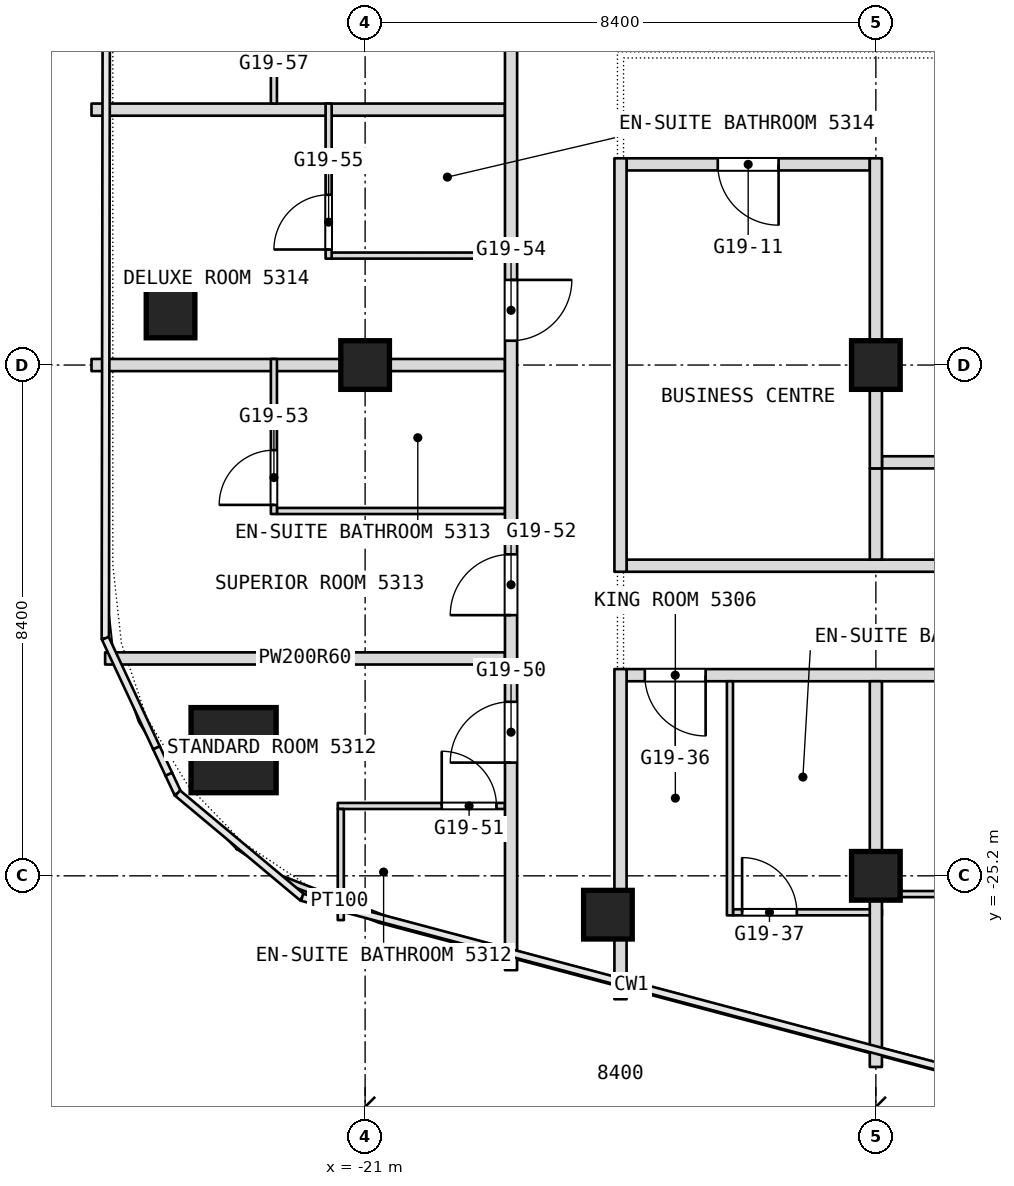
"""IFC4 building model, lengths in metres.
Left out: names, types, materials, properties, quantities, classifications, styles, units other than length and angle.
Written with IfcOpenShell. Run it as: python <this file> out.ifc"""

import sys

from ifc_helpers import new_model, si_unit, direction, frame, frame_2d, origin, origin_2d, place, context, subcontext, project, spatial, rectangle, extrude, element, fill, save


model = new_model("IFC4")
c1 = context("Model", 3, precision=1e-05, world=origin(), true_north=direction((0.0, 1.0)))
c2 = subcontext(c1, "Body", "Model", "MODEL_VIEW")
j1 = project(units=[si_unit("LENGTHUNIT", "METRE"), si_unit("PLANEANGLEUNIT", "RADIAN")], contexts=[c1])
p1 = place(None, origin())
s1 = spatial("IfcSite", under=j1, at=p1, CompositionType="ELEMENT")
p2 = place(p1, origin())
s2 = spatial("IfcBuilding", under=s1, at=p2, CompositionType="ELEMENT")
p3 = place(p2, frame((0.0, 0.0, 227.3)))
s3 = spatial("IfcBuildingStorey", under=s2, at=p3, CompositionType="ELEMENT", Elevation=227.3)
p4 = place(p3, frame((-23.163, -23.133, 0.0), z_axis=(0.0, 0.0, 1.0), x_axis=(1.0, 0.0, 0.0)))
e1 = element("IfcColumn", 1, at=p4, inside=s3, PredefinedType="COLUMN", context=c2, shape_type="SweptSolid", body=[
    extrude(rectangle(XDim=1.4, YDim=1.4, at=origin_2d()), origin(), (0.0, 0.0, 1.0), 3.6),
])
for number, where, z_axis, x_axis in (
    (2, (-21.0, -16.8, 0.0), (0.0, 0.0, 1.0), (1.0, 0.0, 0.0)),
    (3, (-12.6, -25.2, 0.0), (0.0, 0.0, 1.0), (1.0, 0.0, 0.0)),
    (4, (-12.6, -16.8, 0.0), (0.0, 0.0, 1.0), (1.0, 0.0, 0.0)),
    (5, (-24.2, -15.952, 0.0), (0.0, 0.0, 1.0), (1.0, 0.0, 0.0)),
    (6, (-17.007, -25.839, 0.0), (0.0, 0.0, 1.0), (1.0, 0.0, 0.0)),
):
    element("IfcColumn", number, at=place(p3, frame(where, z_axis=z_axis, x_axis=x_axis)), inside=s3, PredefinedType="COLUMN", context=c2, shape_type="SweptSolid", body=[
        extrude(rectangle(XDim=0.8, YDim=0.8, at=origin_2d()), origin(), (0.0, 0.0, 1.0), 3.6),
    ])
p5 = place(p3, frame((-22.386, -25.247, 0.0), z_axis=(0.0, 0.0, 1.0), x_axis=(0.932741240306, -0.360546499959, 0.0)))
e7 = element("IfcWall", 7, at=p5, inside=s3, PredefinedType="PARTITIONING", context=c2, shape_type="SweptSolid", body=[
    extrude(rectangle(XDim=2.066, YDim=0.1, at=frame_2d((1.033, 0.0))), origin(), (0.0, 0.0, 1.0), 3.34),
])
p6 = place(p3, frame((-14.95, -25.8, 0.0), z_axis=(0.0, 0.0, 1.0), x_axis=(1.0, 0.0, 0.0)))
e8 = element("IfcWall", 8, at=p6, inside=s3, PredefinedType="PARTITIONING", context=c2, shape_type="SweptSolid", body=[
    extrude(rectangle(XDim=2.45, YDim=0.1, at=frame_2d((1.225, 0.0))), origin(), (0.0, 0.0, 1.0), 3.34),
])
p7 = place(p6, frame((0.15, 0.0, 0.0)))
e9 = element("IfcOpeningElement", 9, at=p7, cuts=e8, PredefinedType="OPENING", context=c2, shape_type="SweptSolid", body=[
    extrude(rectangle(XDim=0.9, YDim=2.1, at=frame_2d((0.45, 1.05))), frame((0.0, 0.05, 0.0), z_axis=(0.0, -1.0, 0.0), x_axis=(1.0, 0.0, 0.0)), (0.0, 0.0, 1.0), 0.1),
])
p8 = place(p3, frame((-12.5, -25.5, 0.0), z_axis=(0.0, 0.0, 1.0), x_axis=(1.0, 0.0, 0.0)))
e10 = element("IfcWall", 10, at=p8, inside=s3, PredefinedType="PARTITIONING", context=c2, shape_type="SweptSolid", body=[
    extrude(rectangle(XDim=3.55, YDim=0.1, at=frame_2d((1.775, 0.0))), origin(), (0.0, 0.0, 1.0), 3.34),
])
p9 = place(p3, frame((-21.45, -24.051, 0.0), z_axis=(0.0, 0.0, 1.0), x_axis=(1.0, 0.0, 0.0)))
e11 = element("IfcWall", 11, at=p9, inside=s3, PredefinedType="PARTITIONING", context=c2, shape_type="SweptSolid", body=[
    extrude(rectangle(XDim=2.75, YDim=0.1, at=frame_2d((1.375, 0.0))), origin(), (0.0, 0.0, 1.0), 3.34),
])
p10 = place(p9, frame((1.71, 0.0, 0.0)))
e12 = element("IfcOpeningElement", 12, at=p10, cuts=e11, PredefinedType="OPENING", context=c2, shape_type="SweptSolid", body=[
    extrude(rectangle(XDim=0.9, YDim=2.1, at=frame_2d((0.45, 1.05))), frame((0.0, 0.05, 0.0), z_axis=(0.0, -1.0, 0.0), x_axis=(1.0, 0.0, 0.0)), (0.0, 0.0, 1.0), 0.1),
])
p11 = place(p3, frame((-16.7, -21.9, 0.0), z_axis=(0.0, 0.0, 1.0), x_axis=(1.0, 0.0, 0.0)))
e13 = element("IfcWall", 13, at=p11, inside=s3, PredefinedType="PARTITIONING", context=c2, shape_type="SweptSolid", body=[
    extrude(rectangle(XDim=33.4, YDim=0.2, at=frame_2d((16.7, 0.0))), origin(), (0.0, 0.0, 1.0), 3.34),
])
p12 = place(p11, frame((0.3, 0.0, 0.0)))
e14 = element("IfcOpeningElement", 14, at=p12, cuts=e13, PredefinedType="OPENING", context=c2, shape_type="SweptSolid", body=[
    extrude(rectangle(XDim=1.0, YDim=2.1, at=frame_2d((0.5, 1.05))), frame((0.0, 0.1, 0.0), z_axis=(0.0, -1.0, 0.0), x_axis=(1.0, 0.0, 0.0)), (0.0, 0.0, 1.0), 0.2),
])
p13 = place(p11, frame((7.8, 0.0, 0.0)))
e15 = element("IfcOpeningElement", 15, at=p13, cuts=e13, PredefinedType="OPENING", context=c2, shape_type="SweptSolid", body=[
    extrude(rectangle(XDim=1.1, YDim=2.1, at=frame_2d((0.55, 1.05))), frame((0.0, 0.1, 0.0), z_axis=(0.0, -1.0, 0.0), x_axis=(1.0, 0.0, 0.0)), (0.0, 0.0, 1.0), 0.2),
])
p14 = place(p11, frame((14.05, 0.0, 0.0)))
e16 = element("IfcOpeningElement", 16, at=p14, cuts=e13, PredefinedType="OPENING", context=c2, shape_type="SweptSolid", body=[
    extrude(rectangle(XDim=1.1, YDim=2.1, at=frame_2d((0.55, 1.05))), frame((0.0, 0.1, 0.0), z_axis=(0.0, -1.0, 0.0), x_axis=(1.0, 0.0, 0.0)), (0.0, 0.0, 1.0), 0.2),
])
p15 = place(p11, frame((23.7, 0.0, 0.0)))
e17 = element("IfcOpeningElement", 17, at=p15, cuts=e13, PredefinedType="OPENING", context=c2, shape_type="SweptSolid", body=[
    extrude(rectangle(XDim=1.0, YDim=2.1, at=frame_2d((0.5, 1.05))), frame((0.0, 0.1, 0.0), z_axis=(0.0, -1.0, 0.0), x_axis=(1.0, 0.0, 0.0)), (0.0, 0.0, 1.0), 0.2),
])
p16 = place(p11, frame((25.5, 0.0, 0.0)))
e18 = element("IfcOpeningElement", 18, at=p16, cuts=e13, PredefinedType="OPENING", context=c2, shape_type="SweptSolid", body=[
    extrude(rectangle(XDim=1.0, YDim=2.1, at=frame_2d((0.5, 1.05))), frame((0.0, 0.1, 0.0), z_axis=(0.0, -1.0, 0.0), x_axis=(1.0, 0.0, 0.0)), (0.0, 0.0, 1.0), 0.2),
])
p17 = place(p11, frame((29.7, 0.0, 0.0)))
e19 = element("IfcOpeningElement", 19, at=p17, cuts=e13, PredefinedType="OPENING", context=c2, shape_type="SweptSolid", body=[
    extrude(rectangle(XDim=1.0, YDim=2.1, at=frame_2d((0.5, 1.05))), frame((0.0, 0.1, 0.0), z_axis=(0.0, -1.0, 0.0), x_axis=(1.0, 0.0, 0.0)), (0.0, 0.0, 1.0), 0.2),
])
p18 = place(p3, frame((-25.276, -21.625, 0.0), z_axis=(0.0, 0.0, 1.0), x_axis=(1.0, 0.0, 0.0)))
e20 = element("IfcWall", 20, at=p18, inside=s3, PredefinedType="PARTITIONING", context=c2, shape_type="SweptSolid", body=[
    extrude(rectangle(XDim=6.576, YDim=0.2, at=frame_2d((3.288, 0.0))), origin(), (0.0, 0.0, 1.0), 3.34),
])
p19 = place(p3, frame((-16.7, -20.1, 0.0), z_axis=(0.0, 0.0, 1.0), x_axis=(1.0, 0.0, 0.0)))
e21 = element("IfcWall", 21, at=p19, inside=s3, PredefinedType="PARTITIONING", context=c2, shape_type="SweptSolid", body=[
    extrude(rectangle(XDim=33.4, YDim=0.2, at=frame_2d((16.7, 0.0))), origin(), (0.0, 0.0, 1.0), 3.34),
])
p20 = place(p3, frame((-22.45, -19.2, 0.0), z_axis=(0.0, 0.0, 1.0), x_axis=(1.0, 0.0, 0.0)))
e22 = element("IfcWall", 22, at=p20, inside=s3, PredefinedType="PARTITIONING", context=c2, shape_type="SweptSolid", body=[
    extrude(rectangle(XDim=3.75, YDim=0.1, at=frame_2d((1.875, 0.0))), origin(), (0.0, 0.0, 1.0), 3.34),
])
p21 = place(p3, frame((-12.5, -18.4, 0.0), z_axis=(0.0, 0.0, 1.0), x_axis=(1.0, 0.0, 0.0)))
e23 = element("IfcWall", 23, at=p21, inside=s3, PredefinedType="PARTITIONING", context=c2, shape_type="SweptSolid", body=[
    extrude(rectangle(XDim=6.6, YDim=0.2, at=frame_2d((3.3, 0.0))), origin(), (0.0, 0.0, 1.0), 3.34),
])
p22 = place(p3, frame((-25.5, -16.8, 0.0), z_axis=(0.0, 0.0, 1.0), x_axis=(1.0, 0.0, 0.0)))
e24 = element("IfcWall", 24, at=p22, inside=s3, PredefinedType="PARTITIONING", context=c2, shape_type="SweptSolid", body=[
    extrude(rectangle(XDim=6.8, YDim=0.2, at=frame_2d((3.4, 0.0))), origin(), (0.0, 0.0, 1.0), 2.94),
])
p23 = place(p3, frame((-21.55, -15.0, 0.0), z_axis=(0.0, 0.0, 1.0), x_axis=(1.0, 0.0, 0.0)))
e25 = element("IfcWall", 25, at=p23, inside=s3, PredefinedType="PARTITIONING", context=c2, shape_type="SweptSolid", body=[
    extrude(rectangle(XDim=2.85, YDim=0.1, at=frame_2d((1.425, 0.0))), origin(), (0.0, 0.0, 1.0), 3.34),
])
p24 = place(p3, frame((-16.7, -13.5, 0.0), z_axis=(0.0, 0.0, 1.0), x_axis=(1.0, 0.0, 0.0)))
e26 = element("IfcWall", 26, at=p24, inside=s3, PredefinedType="PARTITIONING", context=c2, shape_type="SweptSolid", body=[
    extrude(rectangle(XDim=4.0, YDim=0.2, at=frame_2d((2.0, 0.0))), origin(), (0.0, 0.0, 1.0), 3.34),
])
p25 = place(p24, frame((1.5, 0.0, 0.0)))
e27 = element("IfcOpeningElement", 27, at=p25, cuts=e26, PredefinedType="OPENING", context=c2, shape_type="SweptSolid", body=[
    extrude(rectangle(XDim=1.0, YDim=2.1, at=frame_2d((0.5, 1.05))), frame((0.0, 0.1, 0.0), z_axis=(0.0, -1.0, 0.0), x_axis=(1.0, 0.0, 0.0)), (0.0, 0.0, 1.0), 0.2),
])
p26 = place(p3, frame((-25.5, -12.6, 0.0), z_axis=(0.0, 0.0, 1.0), x_axis=(1.0, 0.0, 0.0)))
e28 = element("IfcWall", 28, at=p26, inside=s3, PredefinedType="PARTITIONING", context=c2, shape_type="SweptSolid", body=[
    extrude(rectangle(XDim=6.8, YDim=0.2, at=frame_2d((3.4, 0.0))), origin(), (0.0, 0.0, 1.0), 3.34),
])
p27 = place(p3, frame((-12.6, -28.343, 0.0), z_axis=(0.0, 0.0, 1.0), x_axis=(0.0, 1.0, 0.0)))
e29 = element("IfcWall", 29, at=p27, inside=s3, PredefinedType="PARTITIONING", context=c2, shape_type="SweptSolid", body=[
    extrude(rectangle(XDim=6.343, YDim=0.2, at=frame_2d((3.171, 0.0))), origin(), (0.0, 0.0, 1.0), 3.34),
])
p28 = place(p3, frame((-12.6, -20.0, 0.0), z_axis=(0.0, 0.0, 1.0), x_axis=(0.0, 1.0, 0.0)))
e30 = element("IfcWall", 30, at=p28, inside=s3, PredefinedType="PARTITIONING", context=c2, shape_type="SweptSolid", body=[
    extrude(rectangle(XDim=1.5, YDim=0.2, at=frame_2d((0.75, 0.0))), origin(), (0.0, 0.0, 1.0), 3.34),
])
p29 = place(p3, frame((-12.6, -18.5, 0.0), z_axis=(0.0, 0.0, 1.0), x_axis=(0.0, 1.0, 0.0)))
e31 = element("IfcWall", 31, at=p29, inside=s3, PredefinedType="PARTITIONING", context=c2, shape_type="SweptSolid", body=[
    extrude(rectangle(XDim=5.1, YDim=0.2, at=frame_2d((2.55, 0.0))), origin(), (0.0, 0.0, 1.0), 3.34),
])
p30 = place(p3, frame((-15.0, -25.85, 0.0), z_axis=(0.0, 0.0, 1.0), x_axis=(0.0, 1.0, 0.0)))
e32 = element("IfcWall", 32, at=p30, inside=s3, PredefinedType="PARTITIONING", context=c2, shape_type="SweptSolid", body=[
    extrude(rectangle(XDim=3.85, YDim=0.1, at=frame_2d((1.925, 0.0))), origin(), (0.0, 0.0, 1.0), 3.34),
])
p31 = place(p3, frame((-16.8, -27.229, 0.0), z_axis=(0.0, 0.0, 1.0), x_axis=(0.0, 1.0, 0.0)))
e33 = element("IfcWall", 33, at=p31, inside=s3, PredefinedType="PARTITIONING", context=c2, shape_type="SweptSolid", body=[
    extrude(rectangle(XDim=5.429, YDim=0.2, at=frame_2d((2.714, 0.0))), origin(), (0.0, 0.0, 1.0), 3.34),
])
p32 = place(p3, frame((-16.8, -20.2, 0.0), z_axis=(0.0, 0.0, 1.0), x_axis=(0.0, 1.0, 0.0)))
e34 = element("IfcWall", 34, at=p32, inside=s3, PredefinedType="PARTITIONING", context=c2, shape_type="SweptSolid", body=[
    extrude(rectangle(XDim=6.8, YDim=0.2, at=frame_2d((3.4, 0.0))), origin(), (0.0, 0.0, 1.0), 3.34),
])
p33 = place(p3, frame((-18.6, -26.751, 0.0), z_axis=(0.0, 0.0, 1.0), x_axis=(0.0, 1.0, 0.0)))
e35 = element("IfcWall", 35, at=p33, inside=s3, PredefinedType="PARTITIONING", context=c2, shape_type="SweptSolid", body=[
    extrude(rectangle(XDim=49.091, YDim=0.2, at=frame_2d((24.545, 0.0))), origin(), (0.0, 0.0, 1.0), 3.34),
])
p34 = place(p33, frame((3.413, 0.0, 0.0)))
e36 = element("IfcOpeningElement", 36, at=p34, cuts=e35, PredefinedType="OPENING", context=c2, shape_type="SweptSolid", body=[
    extrude(rectangle(XDim=1.0, YDim=2.1, at=frame_2d((0.5, 1.05))), frame((0.0, 0.1, 0.0), z_axis=(0.0, -1.0, 0.0), x_axis=(1.0, 0.0, 0.0)), (0.0, 0.0, 1.0), 0.2),
])
p35 = place(p33, frame((5.838, 0.0, 0.0)))
e37 = element("IfcOpeningElement", 37, at=p35, cuts=e35, PredefinedType="OPENING", context=c2, shape_type="SweptSolid", body=[
    extrude(rectangle(XDim=1.0, YDim=2.1, at=frame_2d((0.5, 1.05))), frame((0.0, 0.1, 0.0), z_axis=(0.0, -1.0, 0.0), x_axis=(1.0, 0.0, 0.0)), (0.0, 0.0, 1.0), 0.2),
])
p36 = place(p33, frame((10.351, 0.0, 0.0)))
e38 = element("IfcOpeningElement", 38, at=p36, cuts=e35, PredefinedType="OPENING", context=c2, shape_type="SweptSolid", body=[
    extrude(rectangle(XDim=1.0, YDim=2.1, at=frame_2d((0.5, 1.05))), frame((0.0, 0.1, 0.0), z_axis=(0.0, -1.0, 0.0), x_axis=(1.0, 0.0, 0.0)), (0.0, 0.0, 1.0), 0.2),
])
p37 = place(p33, frame((16.951, 0.0, 0.0)))
e39 = element("IfcOpeningElement", 39, at=p37, cuts=e35, PredefinedType="OPENING", context=c2, shape_type="SweptSolid", body=[
    extrude(rectangle(XDim=1.0, YDim=2.1, at=frame_2d((0.5, 1.05))), frame((0.0, 0.1, 0.0), z_axis=(0.0, -1.0, 0.0), x_axis=(1.0, 0.0, 0.0)), (0.0, 0.0, 1.0), 0.2),
])
p38 = place(p33, frame((21.151, 0.0, 0.0)))
e40 = element("IfcOpeningElement", 40, at=p38, cuts=e35, PredefinedType="OPENING", context=c2, shape_type="SweptSolid", body=[
    extrude(rectangle(XDim=1.0, YDim=2.1, at=frame_2d((0.5, 1.05))), frame((0.0, 0.1, 0.0), z_axis=(0.0, -1.0, 0.0), x_axis=(1.0, 0.0, 0.0)), (0.0, 0.0, 1.0), 0.2),
])
p39 = place(p33, frame((22.951, 0.0, 0.0)))
e41 = element("IfcOpeningElement", 41, at=p39, cuts=e35, PredefinedType="OPENING", context=c2, shape_type="SweptSolid", body=[
    extrude(rectangle(XDim=1.0, YDim=2.1, at=frame_2d((0.5, 1.05))), frame((0.0, 0.1, 0.0), z_axis=(0.0, -1.0, 0.0), x_axis=(1.0, 0.0, 0.0)), (0.0, 0.0, 1.0), 0.2),
])
p40 = place(p33, frame((30.351, 0.0, 0.0)))
e42 = element("IfcOpeningElement", 42, at=p40, cuts=e35, PredefinedType="OPENING", context=c2, shape_type="SweptSolid", body=[
    extrude(rectangle(XDim=1.1, YDim=2.1, at=frame_2d((0.55, 1.05))), frame((0.0, 0.1, 0.0), z_axis=(0.0, -1.0, 0.0), x_axis=(1.0, 0.0, 0.0)), (0.0, 0.0, 1.0), 0.2),
])
p41 = place(p33, frame((37.951, 0.0, 0.0)))
e43 = element("IfcOpeningElement", 43, at=p41, cuts=e35, PredefinedType="OPENING", context=c2, shape_type="SweptSolid", body=[
    extrude(rectangle(XDim=1.0, YDim=2.1, at=frame_2d((0.5, 1.05))), frame((0.0, 0.1, 0.0), z_axis=(0.0, -1.0, 0.0), x_axis=(1.0, 0.0, 0.0)), (0.0, 0.0, 1.0), 0.2),
])
p42 = place(p33, frame((39.751, 0.0, 0.0)))
e44 = element("IfcOpeningElement", 44, at=p42, cuts=e35, PredefinedType="OPENING", context=c2, shape_type="SweptSolid", body=[
    extrude(rectangle(XDim=1.0, YDim=2.1, at=frame_2d((0.5, 1.05))), frame((0.0, 0.1, 0.0), z_axis=(0.0, -1.0, 0.0), x_axis=(1.0, 0.0, 0.0)), (0.0, 0.0, 1.0), 0.2),
])
p43 = place(p33, frame((44.051, 0.0, 0.0)))
e45 = element("IfcOpeningElement", 45, at=p43, cuts=e35, PredefinedType="OPENING", context=c2, shape_type="SweptSolid", body=[
    extrude(rectangle(XDim=1.0, YDim=2.1, at=frame_2d((0.5, 1.05))), frame((0.0, 0.1, 0.0), z_axis=(0.0, -1.0, 0.0), x_axis=(1.0, 0.0, 0.0)), (0.0, 0.0, 1.0), 0.2),
])
p44 = place(p3, frame((-21.4, -25.928, 0.0), z_axis=(0.0, 0.0, 1.0), x_axis=(0.0, 1.0, 0.0)))
e46 = element("IfcWall", 46, at=p44, inside=s3, PredefinedType="PARTITIONING", context=c2, shape_type="SweptSolid", body=[
    extrude(rectangle(XDim=1.827, YDim=0.1, at=frame_2d((0.914, 0.0))), origin(), (0.0, 0.0, 1.0), 3.34),
])
p45 = place(p3, frame((-21.6, -15.05, 0.0), z_axis=(0.0, 0.0, 1.0), x_axis=(0.0, 1.0, 0.0)))
e47 = element("IfcWall", 47, at=p45, inside=s3, PredefinedType="PARTITIONING", context=c2, shape_type="SweptSolid", body=[
    extrude(rectangle(XDim=2.55, YDim=0.1, at=frame_2d((1.275, 0.0))), origin(), (0.0, 0.0, 1.0), 3.34),
])
p46 = place(p45, frame((0.15, 0.0, 0.0)))
e48 = element("IfcOpeningElement", 48, at=p46, cuts=e47, PredefinedType="OPENING", context=c2, shape_type="SweptSolid", body=[
    extrude(rectangle(XDim=0.9, YDim=2.1, at=frame_2d((0.45, 1.05))), frame((0.0, 0.05, 0.0), z_axis=(0.0, -1.0, 0.0), x_axis=(1.0, 0.0, 0.0)), (0.0, 0.0, 1.0), 0.1),
])
p47 = place(p3, frame((-22.5, -19.25, 0.0), z_axis=(0.0, 0.0, 1.0), x_axis=(0.0, 1.0, 0.0)))
e49 = element("IfcWall", 49, at=p47, inside=s3, PredefinedType="PARTITIONING", context=c2, shape_type="SweptSolid", body=[
    extrude(rectangle(XDim=2.55, YDim=0.1, at=frame_2d((1.275, 0.0))), origin(), (0.0, 0.0, 1.0), 3.34),
])
p48 = place(p47, frame((0.15, 0.0, 0.0)))
e50 = element("IfcOpeningElement", 50, at=p48, cuts=e49, PredefinedType="OPENING", context=c2, shape_type="SweptSolid", body=[
    extrude(rectangle(XDim=0.9, YDim=2.1, at=frame_2d((0.45, 1.05))), frame((0.0, 0.05, 0.0), z_axis=(0.0, -1.0, 0.0), x_axis=(1.0, 0.0, 0.0)), (0.0, 0.0, 1.0), 0.1),
])
p49 = place(p3, frame((-22.5, -12.5, 0.0), z_axis=(0.0, 0.0, 1.0), x_axis=(0.0, 1.0, 0.0)))
e51 = element("IfcWall", 51, at=p49, inside=s3, PredefinedType="PARTITIONING", context=c2, shape_type="SweptSolid", body=[
    extrude(rectangle(XDim=2.25, YDim=0.1, at=frame_2d((1.125, 0.0))), origin(), (0.0, 0.0, 1.0), 3.34),
])
p50 = place(p49, frame((1.2, 0.0, 0.0)))
e52 = element("IfcOpeningElement", 52, at=p50, cuts=e51, PredefinedType="OPENING", context=c2, shape_type="SweptSolid", body=[
    extrude(rectangle(XDim=0.9, YDim=2.1, at=frame_2d((0.45, 1.05))), frame((0.0, 0.05, 0.0), z_axis=(0.0, -1.0, 0.0), x_axis=(1.0, 0.0, 0.0)), (0.0, 0.0, 1.0), 0.1),
])
p51 = place(p7, origin())
e53 = element("IfcDoor", 53, at=p51, inside=s3, OperationType="SINGLE_SWING_LEFT", PredefinedType="DOOR", context=c2, shape_type="SweptSolid", body=[
    extrude(rectangle(XDim=0.9, YDim=2.1, at=frame_2d((0.45, 1.05))), frame((0.0, 0.025, 0.0), z_axis=(0.0, -1.0, 0.0), x_axis=(1.0, 0.0, 0.0)), (0.0, 0.0, 1.0), 0.05),
])
fill(e9, e53)
p52 = place(p10, origin())
e54 = element("IfcDoor", 54, at=p52, inside=s3, OperationType="SINGLE_SWING_LEFT", PredefinedType="DOOR", context=c2, shape_type="SweptSolid", body=[
    extrude(rectangle(XDim=0.9, YDim=2.1, at=frame_2d((0.45, 1.05))), frame((0.0, 0.025, 0.0), z_axis=(0.0, -1.0, 0.0), x_axis=(1.0, 0.0, 0.0)), (0.0, 0.0, 1.0), 0.05),
])
fill(e12, e54)
p53 = place(p12, origin())
e55 = element("IfcDoor", 55, at=p53, inside=s3, OperationType="SINGLE_SWING_RIGHT", PredefinedType="DOOR", context=c2, shape_type="SweptSolid", body=[
    extrude(rectangle(XDim=1.0, YDim=2.1, at=frame_2d((0.5, 1.05))), frame((0.0, 0.025, 0.0), z_axis=(0.0, -1.0, 0.0), x_axis=(1.0, 0.0, 0.0)), (0.0, 0.0, 1.0), 0.05),
])
fill(e14, e55)
p54 = place(p25, origin())
e56 = element("IfcDoor", 56, at=p54, inside=s3, OperationType="SINGLE_SWING_LEFT", PredefinedType="DOOR", context=c2, shape_type="SweptSolid", body=[
    extrude(rectangle(XDim=1.0, YDim=2.1, at=frame_2d((0.5, 1.05))), frame((0.0, 0.025, 0.0), z_axis=(0.0, -1.0, 0.0), x_axis=(1.0, 0.0, 0.0)), (0.0, 0.0, 1.0), 0.05),
])
fill(e27, e56)
p55 = place(p34, origin())
e57 = element("IfcDoor", 57, at=p55, inside=s3, OperationType="SINGLE_SWING_LEFT", PredefinedType="DOOR", context=c2, shape_type="SweptSolid", body=[
    extrude(rectangle(XDim=1.0, YDim=2.1, at=frame_2d((0.5, 1.05))), frame((0.0, 0.025, 0.0), z_axis=(0.0, -1.0, 0.0), x_axis=(1.0, 0.0, 0.0)), (0.0, 0.0, 1.0), 0.05),
])
fill(e36, e57)
p56 = place(p35, origin())
e58 = element("IfcDoor", 58, at=p56, inside=s3, OperationType="SINGLE_SWING_LEFT", PredefinedType="DOOR", context=c2, shape_type="SweptSolid", body=[
    extrude(rectangle(XDim=1.0, YDim=2.1, at=frame_2d((0.5, 1.05))), frame((0.0, 0.025, 0.0), z_axis=(0.0, -1.0, 0.0), x_axis=(1.0, 0.0, 0.0)), (0.0, 0.0, 1.0), 0.05),
])
fill(e37, e58)
p57 = place(p36, origin())
e59 = element("IfcDoor", 59, at=p57, inside=s3, OperationType="SINGLE_SWING_LEFT", PredefinedType="DOOR", context=c2, shape_type="SweptSolid", body=[
    extrude(rectangle(XDim=1.0, YDim=2.1, at=frame_2d((0.5, 1.05))), frame((0.0, 0.025, 0.0), z_axis=(0.0, -1.0, 0.0), x_axis=(1.0, 0.0, 0.0)), (0.0, 0.0, 1.0), 0.05),
])
fill(e38, e59)
p58 = place(p46, origin())
e60 = element("IfcDoor", 60, at=p58, inside=s3, OperationType="SINGLE_SWING_RIGHT", PredefinedType="DOOR", context=c2, shape_type="SweptSolid", body=[
    extrude(rectangle(XDim=0.9, YDim=2.1, at=frame_2d((0.45, 1.05))), frame((0.0, 0.025, 0.0), z_axis=(0.0, -1.0, 0.0), x_axis=(1.0, 0.0, 0.0)), (0.0, 0.0, 1.0), 0.05),
])
fill(e48, e60)
p59 = place(p48, origin())
e61 = element("IfcDoor", 61, at=p59, inside=s3, OperationType="SINGLE_SWING_RIGHT", PredefinedType="DOOR", context=c2, shape_type="SweptSolid", body=[
    extrude(rectangle(XDim=0.9, YDim=2.1, at=frame_2d((0.45, 1.05))), frame((0.0, 0.025, 0.0), z_axis=(0.0, -1.0, 0.0), x_axis=(1.0, 0.0, 0.0)), (0.0, 0.0, 1.0), 0.05),
])
fill(e50, e61)
save(model, sys.argv[1])
